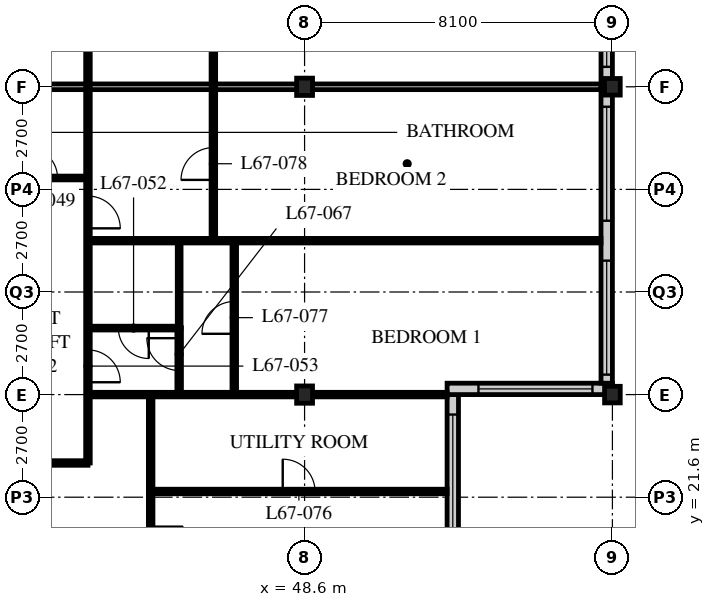
"""IFC4 building model, lengths in metres.
Left out: names, types, materials, properties, quantities, classifications, styles, units other than length and angle.
Written with IfcOpenShell. Run it as: python <this file> out.ifc"""

import sys

from ifc_helpers import new_model, si_unit, direction, frame, frame_2d, origin, origin_2d, place, context, subcontext, project, spatial, rectangle, i_section, extrude, element, fill, save


model = new_model("IFC4")
c1 = context("Model", 3, precision=1e-05, world=origin(), true_north=direction((0.0, 1.0)))
c2 = subcontext(c1, "Body", "Model", "MODEL_VIEW")
j1 = project(units=[si_unit("LENGTHUNIT", "METRE"), si_unit("PLANEANGLEUNIT", "RADIAN")], contexts=[c1])
p1 = place(None, origin())
s1 = spatial("IfcSite", under=j1, at=p1, CompositionType="ELEMENT")
p2 = place(p1, origin())
s2 = spatial("IfcBuilding", under=s1, at=p2, CompositionType="ELEMENT")
p3 = place(p2, frame((0.0, 0.0, 261.9)))
s3 = spatial("IfcBuildingStorey", under=s2, at=p3, CompositionType="ELEMENT", Elevation=261.9)
for number, where, z_axis, x_axis in (
    (1, (48.6, 24.3, 0.0), (0.0, 0.0, 1.0), (1.0, 0.0, 0.0)),
    (2, (48.6, 32.4, 0.0), (0.0, 0.0, 1.0), (1.0, 0.0, 0.0)),
):
    element("IfcColumn", number, at=place(p3, frame(where, z_axis=z_axis, x_axis=x_axis)), inside=s3, PredefinedType="COLUMN", context=c2, shape_type="SweptSolid", body=[
        extrude(i_section(OverallWidth=0.418, OverallDepth=0.456, WebThickness=0.042, FlangeThickness=0.067, FilletRadius=0.015, at=origin_2d()), origin(), (0.0, 0.0, 1.0), 3.9),
    ])
for number, where, z_axis, x_axis in (
    (3, (56.7, 24.3, 0.0), (0.0, 0.0, 1.0), (1.0, 0.0, 0.0)),
    (4, (56.7, 32.4, 0.0), (0.0, 0.0, 1.0), (1.0, 0.0, 0.0)),
):
    element("IfcColumn", number, at=place(p3, frame(where, z_axis=z_axis, x_axis=x_axis)), inside=s3, PredefinedType="COLUMN", context=c2, shape_type="SweptSolid", body=[
        extrude(i_section(OverallWidth=0.412, OverallDepth=0.437, WebThickness=0.036, FlangeThickness=0.058, FilletRadius=0.015, at=origin_2d()), origin(), (0.0, 0.0, 1.0), 3.9),
    ])
p4 = place(p3, frame((52.5, 20.55, 0.0), z_axis=(0.0, 0.0, 1.0), x_axis=(0.0, 1.0, 0.0)))
e5 = element("IfcWall", 5, at=p4, inside=s3, PredefinedType="SOLIDWALL", context=c2, shape_type="SweptSolid", body=[
    extrude(rectangle(XDim=3.75, YDim=0.3, at=frame_2d((1.875, 0.0))), origin(), (0.0, 0.0, 1.0), 3.69),
])
p5 = place(p4, frame((0.225, 0.0, 0.6)))
e6 = element("IfcOpeningElement", 6, at=p5, cuts=e5, PredefinedType="OPENING", context=c2, shape_type="SweptSolid", body=[
    extrude(rectangle(XDim=3.0, YDim=2.3, at=frame_2d((1.5, 1.15))), frame((0.0, 0.16, 0.0), z_axis=(0.0, -1.0, 0.0), x_axis=(1.0, 0.0, 0.0)), (0.0, 0.0, 1.0), 0.32),
])
p6 = place(p3, frame((52.35, 24.45, 0.0), z_axis=(0.0, 0.0, 1.0), x_axis=(1.0, 0.0, 0.0)))
e7 = element("IfcWall", 7, at=p6, inside=s3, PredefinedType="SOLIDWALL", context=c2, shape_type="SweptSolid", body=[
    extrude(rectangle(XDim=4.35, YDim=0.3, at=frame_2d((2.175, 0.0))), origin(), (0.0, 0.0, 1.0), 3.69),
])
p7 = place(p6, frame((0.825, 0.0, 0.6)))
e8 = element("IfcOpeningElement", 8, at=p7, cuts=e7, PredefinedType="OPENING", context=c2, shape_type="SweptSolid", body=[
    extrude(rectangle(XDim=3.0, YDim=2.3, at=frame_2d((1.5, 1.15))), frame((0.0, 0.16, 0.0), z_axis=(0.0, -1.0, 0.0), x_axis=(1.0, 0.0, 0.0)), (0.0, 0.0, 1.0), 0.32),
])
p8 = place(p3, frame((56.55, 24.6, 0.0), z_axis=(0.0, 0.0, 1.0), x_axis=(0.0, 1.0, 0.0)))
e9 = element("IfcWall", 9, at=p8, inside=s3, PredefinedType="SOLIDWALL", context=c2, shape_type="SweptSolid", body=[
    extrude(rectangle(XDim=32.1, YDim=0.3, at=frame_2d((16.05, 0.0))), origin(), (0.0, 0.0, 1.0), 3.69),
])
p9 = place(p8, frame((0.225, 0.0, 0.6)))
e10 = element("IfcOpeningElement", 10, at=p9, cuts=e9, PredefinedType="OPENING", context=c2, shape_type="SweptSolid", body=[
    extrude(rectangle(XDim=3.0, YDim=2.4, at=frame_2d((1.5, 1.2))), frame((0.0, 0.16, 0.0), z_axis=(0.0, -1.0, 0.0), x_axis=(1.0, 0.0, 0.0)), (0.0, 0.0, 1.0), 0.32),
])
p10 = place(p8, frame((4.275, 0.0, 0.6)))
e11 = element("IfcOpeningElement", 11, at=p10, cuts=e9, PredefinedType="OPENING", context=c2, shape_type="SweptSolid", body=[
    extrude(rectangle(XDim=3.0, YDim=2.4, at=frame_2d((1.5, 1.2))), frame((0.0, 0.16, 0.0), z_axis=(0.0, -1.0, 0.0), x_axis=(1.0, 0.0, 0.0)), (0.0, 0.0, 1.0), 0.32),
])
p11 = place(p8, frame((8.325, 0.0, 0.6)))
e12 = element("IfcOpeningElement", 12, at=p11, cuts=e9, PredefinedType="OPENING", context=c2, shape_type="SweptSolid", body=[
    extrude(rectangle(XDim=3.0, YDim=2.4, at=frame_2d((1.5, 1.2))), frame((0.0, 0.16, 0.0), z_axis=(0.0, -1.0, 0.0), x_axis=(1.0, 0.0, 0.0)), (0.0, 0.0, 1.0), 0.32),
])
p12 = place(p8, frame((12.375, 0.0, 0.6)))
e13 = element("IfcOpeningElement", 13, at=p12, cuts=e9, PredefinedType="OPENING", context=c2, shape_type="SweptSolid", body=[
    extrude(rectangle(XDim=3.0, YDim=2.4, at=frame_2d((1.5, 1.2))), frame((0.0, 0.16, 0.0), z_axis=(0.0, -1.0, 0.0), x_axis=(1.0, 0.0, 0.0)), (0.0, 0.0, 1.0), 0.32),
])
p13 = place(p8, frame((16.425, 0.0, 0.6)))
e14 = element("IfcOpeningElement", 14, at=p13, cuts=e9, PredefinedType="OPENING", context=c2, shape_type="SweptSolid", body=[
    extrude(rectangle(XDim=3.0, YDim=2.4, at=frame_2d((1.5, 1.2))), frame((0.0, 0.16, 0.0), z_axis=(0.0, -1.0, 0.0), x_axis=(1.0, 0.0, 0.0)), (0.0, 0.0, 1.0), 0.32),
])
p14 = place(p8, frame((20.475, 0.0, 0.6)))
e15 = element("IfcOpeningElement", 15, at=p14, cuts=e9, PredefinedType="OPENING", context=c2, shape_type="SweptSolid", body=[
    extrude(rectangle(XDim=3.0, YDim=2.4, at=frame_2d((1.5, 1.2))), frame((0.0, 0.16, 0.0), z_axis=(0.0, -1.0, 0.0), x_axis=(1.0, 0.0, 0.0)), (0.0, 0.0, 1.0), 0.32),
])
p15 = place(p8, frame((24.525, 0.0, 0.6)))
e16 = element("IfcOpeningElement", 16, at=p15, cuts=e9, PredefinedType="OPENING", context=c2, shape_type="SweptSolid", body=[
    extrude(rectangle(XDim=3.0, YDim=2.4, at=frame_2d((1.5, 1.2))), frame((0.0, 0.16, 0.0), z_axis=(0.0, -1.0, 0.0), x_axis=(1.0, 0.0, 0.0)), (0.0, 0.0, 1.0), 0.32),
])
p16 = place(p8, frame((28.575, 0.0, 0.6)))
e17 = element("IfcOpeningElement", 17, at=p16, cuts=e9, PredefinedType="OPENING", context=c2, shape_type="SweptSolid", body=[
    extrude(rectangle(XDim=3.0, YDim=2.4, at=frame_2d((1.5, 1.2))), frame((0.0, 0.16, 0.0), z_axis=(0.0, -1.0, 0.0), x_axis=(1.0, 0.0, 0.0)), (0.0, 0.0, 1.0), 0.32),
])
p17 = place(p3, frame((40.5, 30.0, 0.0), z_axis=(0.0, 0.0, 1.0), x_axis=(1.0, 0.0, 0.0)))
e18 = element("IfcWall", 18, at=p17, inside=s3, PredefinedType="PARTITIONING", context=c2, shape_type="SweptSolid", body=[
    extrude(rectangle(XDim=2.4, YDim=0.1, at=frame_2d((1.2, 0.0))), origin(), (0.0, 0.0, 1.0), 3.69),
])
p18 = place(p17, frame((0.8, 0.0, 0.0)))
e19 = element("IfcOpeningElement", 19, at=p18, cuts=e18, PredefinedType="OPENING", context=c2, shape_type="SweptSolid", body=[
    extrude(rectangle(XDim=0.8, YDim=2.1, at=frame_2d((0.4, 1.05))), frame((0.0, 0.06, 0.0), z_axis=(0.0, -1.0, 0.0), x_axis=(1.0, 0.0, 0.0)), (0.0, 0.0, 1.0), 0.12),
])
p19 = place(p3, frame((42.9, 22.5, 0.0), z_axis=(0.0, 0.0, 1.0), x_axis=(0.0, 1.0, 0.0)))
e20 = element("IfcWall", 20, at=p19, inside=s3, PredefinedType="PARTITIONING", context=c2, shape_type="SweptSolid", body=[
    extrude(rectangle(XDim=9.9, YDim=0.12, at=frame_2d((4.95, 0.0))), origin(), (0.0, 0.0, 1.0), 3.69),
])
p20 = place(p19, frame((2.125, 0.0, 0.0)))
e21 = element("IfcOpeningElement", 21, at=p20, cuts=e20, PredefinedType="OPENING", context=c2, shape_type="SweptSolid", body=[
    extrude(rectangle(XDim=0.85, YDim=2.1, at=frame_2d((0.425, 1.05))), frame((0.0, 0.07, 0.0), z_axis=(0.0, -1.0, 0.0), x_axis=(1.0, 0.0, 0.0)), (0.0, 0.0, 1.0), 0.14),
])
p21 = place(p19, frame((6.175, 0.0, 0.0)))
e22 = element("IfcOpeningElement", 22, at=p21, cuts=e20, PredefinedType="OPENING", context=c2, shape_type="SweptSolid", body=[
    extrude(rectangle(XDim=0.85, YDim=2.1, at=frame_2d((0.425, 1.05))), frame((0.0, 0.07, 0.0), z_axis=(0.0, -1.0, 0.0), x_axis=(1.0, 0.0, 0.0)), (0.0, 0.0, 1.0), 0.14),
])
p22 = place(p3, frame((36.45, 22.5, 0.0), z_axis=(0.0, 0.0, 1.0), x_axis=(1.0, 0.0, 0.0)))
e23 = element("IfcWall", 23, at=p22, inside=s3, PredefinedType="PARTITIONING", context=c2, shape_type="SweptSolid", body=[
    extrude(rectangle(XDim=6.45, YDim=0.12, at=frame_2d((3.225, 0.0))), origin(), (0.0, 0.0, 1.0), 3.69),
])
p23 = place(p22, frame((2.8, 0.0, 0.0)))
e24 = element("IfcOpeningElement", 24, at=p23, cuts=e23, PredefinedType="OPENING", context=c2, shape_type="SweptSolid", body=[
    extrude(rectangle(XDim=0.85, YDim=2.1, at=frame_2d((0.425, 1.05))), frame((0.0, 0.07, 0.0), z_axis=(0.0, -1.0, 0.0), x_axis=(1.0, 0.0, 0.0)), (0.0, 0.0, 1.0), 0.14),
])
p24 = place(p3, frame((42.9, 24.3, 0.0), z_axis=(0.0, 0.0, 1.0), x_axis=(1.0, 0.0, 0.0)))
e25 = element("IfcWall", 25, at=p24, inside=s3, PredefinedType="PARTITIONING", context=c2, shape_type="SweptSolid", body=[
    extrude(rectangle(XDim=9.45, YDim=0.12, at=frame_2d((4.725, 0.0))), origin(), (0.0, 0.0, 1.0), 3.078),
])
p25 = place(p3, frame((40.5, 32.4, 0.0), z_axis=(0.0, 0.0, 1.0), x_axis=(1.0, 0.0, 0.0)))
e26 = element("IfcWall", 26, at=p25, inside=s3, PredefinedType="PARTITIONING", context=c2, shape_type="SweptSolid", body=[
    extrude(rectangle(XDim=15.9, YDim=0.15, at=frame_2d((7.95, 0.0))), origin(), (0.0, 0.0, 1.0), 3.078),
])
p26 = place(p3, frame((44.55, 16.5, 0.0), z_axis=(0.0, 0.0, 1.0), x_axis=(0.0, 1.0, 0.0)))
e27 = element("IfcWall", 27, at=p26, inside=s3, PredefinedType="PARTITIONING", context=c2, shape_type="SweptSolid", body=[
    extrude(rectangle(XDim=7.8, YDim=0.12, at=frame_2d((3.9, 0.0))), origin(), (0.0, 0.0, 1.0), 3.69),
])
p27 = place(p26, frame((3.475, 0.0, 0.0)))
e28 = element("IfcOpeningElement", 28, at=p27, cuts=e27, PredefinedType="OPENING", context=c2, shape_type="SweptSolid", body=[
    extrude(rectangle(XDim=0.85, YDim=2.1, at=frame_2d((0.425, 1.05))), frame((0.0, 0.07, 0.0), z_axis=(0.0, -1.0, 0.0), x_axis=(1.0, 0.0, 0.0)), (0.0, 0.0, 1.0), 0.14),
])
p28 = place(p3, frame((42.9, 26.05, 0.0), z_axis=(0.0, 0.0, 1.0), x_axis=(1.0, 0.0, 0.0)))
e29 = element("IfcWall", 29, at=p28, inside=s3, PredefinedType="PARTITIONING", context=c2, shape_type="SweptSolid", body=[
    extrude(rectangle(XDim=2.4, YDim=0.1, at=frame_2d((1.2, 0.0))), origin(), (0.0, 0.0, 1.0), 3.69),
])
p29 = place(p28, frame((0.8, 0.0, 0.0)))
e30 = element("IfcOpeningElement", 30, at=p29, cuts=e29, PredefinedType="OPENING", context=c2, shape_type="SweptSolid", body=[
    extrude(rectangle(XDim=0.8, YDim=2.1, at=frame_2d((0.4, 1.05))), frame((0.0, 0.06, 0.0), z_axis=(0.0, -1.0, 0.0), x_axis=(1.0, 0.0, 0.0)), (0.0, 0.0, 1.0), 0.12),
])
p30 = place(p3, frame((45.3, 26.05, 0.0), z_axis=(0.0, 0.0, 1.0), x_axis=(0.0, 1.0, 0.0)))
e31 = element("IfcWall", 31, at=p30, inside=s3, PredefinedType="PARTITIONING", context=c2, shape_type="SweptSolid", body=[
    extrude(rectangle(XDim=2.3, YDim=0.1, at=frame_2d((1.15, 0.0))), origin(), (0.0, 0.0, 1.0), 3.69),
])
p31 = place(p3, frame((42.9, 28.35, 0.0), z_axis=(0.0, 0.0, 1.0), x_axis=(1.0, 0.0, 0.0)))
e32 = element("IfcWall", 32, at=p31, inside=s3, PredefinedType="PARTITIONING", context=c2, shape_type="SweptSolid", body=[
    extrude(rectangle(XDim=13.5, YDim=0.12, at=frame_2d((6.75, 0.0))), origin(), (0.0, 0.0, 1.0), 3.69),
])
p32 = place(p3, frame((42.9, 48.6, 0.0), z_axis=(0.0, 0.0, 1.0), x_axis=(0.0, -1.0, 0.0)))
e33 = element("IfcWall", 33, at=p32, inside=s3, PredefinedType="PARTITIONING", context=c2, shape_type="SweptSolid", body=[
    extrude(rectangle(XDim=16.2, YDim=0.12, at=frame_2d((8.1, 0.0))), origin(), (0.0, 0.0, 1.0), 3.69),
])
p33 = place(p32, frame((2.125, 0.0, 0.0)))
e34 = element("IfcOpeningElement", 34, at=p33, cuts=e33, PredefinedType="OPENING", context=c2, shape_type="SweptSolid", body=[
    extrude(rectangle(XDim=0.85, YDim=2.1, at=frame_2d((0.425, 1.05))), frame((0.0, 0.07, 0.0), z_axis=(0.0, -1.0, 0.0), x_axis=(1.0, 0.0, 0.0)), (0.0, 0.0, 1.0), 0.14),
])
p34 = place(p32, frame((8.425, 0.0, 0.0)))
e35 = element("IfcOpeningElement", 35, at=p34, cuts=e33, PredefinedType="OPENING", context=c2, shape_type="SweptSolid", body=[
    extrude(rectangle(XDim=0.85, YDim=2.1, at=frame_2d((0.425, 1.05))), frame((0.0, 0.07, 0.0), z_axis=(0.0, -1.0, 0.0), x_axis=(1.0, 0.0, 0.0)), (0.0, 0.0, 1.0), 0.14),
])
p35 = place(p32, frame((12.475, 0.0, 0.0)))
e36 = element("IfcOpeningElement", 36, at=p35, cuts=e33, PredefinedType="OPENING", context=c2, shape_type="SweptSolid", body=[
    extrude(rectangle(XDim=0.85, YDim=2.1, at=frame_2d((0.425, 1.05))), frame((0.0, 0.07, 0.0), z_axis=(0.0, -1.0, 0.0), x_axis=(1.0, 0.0, 0.0)), (0.0, 0.0, 1.0), 0.14),
])
p36 = place(p3, frame((45.3, 24.3, 0.0), z_axis=(0.0, 0.0, 1.0), x_axis=(0.0, 1.0, 0.0)))
e37 = element("IfcWall", 37, at=p36, inside=s3, PredefinedType="PARTITIONING", context=c2, shape_type="SweptSolid", body=[
    extrude(rectangle(XDim=1.76, YDim=0.12, at=frame_2d((0.88, 0.0))), origin(), (0.0, 0.0, 1.0), 3.69),
])
p37 = place(p36, frame((0.635, 0.0, 0.0)))
e38 = element("IfcOpeningElement", 38, at=p37, cuts=e37, PredefinedType="OPENING", context=c2, shape_type="SweptSolid", body=[
    extrude(rectangle(XDim=0.85, YDim=2.1, at=frame_2d((0.425, 1.05))), frame((0.0, 0.07, 0.0), z_axis=(0.0, -1.0, 0.0), x_axis=(1.0, 0.0, 0.0)), (0.0, 0.0, 1.0), 0.14),
])
p38 = place(p3, frame((44.55, 21.75, 0.0), z_axis=(0.0, 0.0, 1.0), x_axis=(1.0, 0.0, 0.0)))
e39 = element("IfcWall", 39, at=p38, inside=s3, PredefinedType="PARTITIONING", context=c2, shape_type="SweptSolid", body=[
    extrude(rectangle(XDim=7.8, YDim=0.12, at=frame_2d((3.9, 0.0))), origin(), (0.0, 0.0, 1.0), 3.69),
])
p39 = place(p38, frame((3.475, 0.0, 0.0)))
e40 = element("IfcOpeningElement", 40, at=p39, cuts=e39, PredefinedType="OPENING", context=c2, shape_type="SweptSolid", body=[
    extrude(rectangle(XDim=0.85, YDim=2.1, at=frame_2d((0.425, 1.05))), frame((0.0, 0.07, 0.0), z_axis=(0.0, -1.0, 0.0), x_axis=(1.0, 0.0, 0.0)), (0.0, 0.0, 1.0), 0.14),
])
p40 = place(p3, frame((46.75, 24.3, 0.0), z_axis=(0.0, 0.0, 1.0), x_axis=(0.0, 1.0, 0.0)))
e41 = element("IfcWall", 41, at=p40, inside=s3, PredefinedType="PARTITIONING", context=c2, shape_type="SweptSolid", body=[
    extrude(rectangle(XDim=4.05, YDim=0.12, at=frame_2d((2.025, 0.0))), origin(), (0.0, 0.0, 1.0), 3.69),
])
p41 = place(p40, frame((1.6, 0.0, 0.0)))
e42 = element("IfcOpeningElement", 42, at=p41, cuts=e41, PredefinedType="OPENING", context=c2, shape_type="SweptSolid", body=[
    extrude(rectangle(XDim=0.85, YDim=2.1, at=frame_2d((0.425, 1.05))), frame((0.0, 0.07, 0.0), z_axis=(0.0, -1.0, 0.0), x_axis=(1.0, 0.0, 0.0)), (0.0, 0.0, 1.0), 0.14),
])
p42 = place(p3, frame((46.2, 28.35, 0.0), z_axis=(0.0, 0.0, 1.0), x_axis=(0.0, 1.0, 0.0)))
e43 = element("IfcWall", 43, at=p42, inside=s3, PredefinedType="PARTITIONING", context=c2, shape_type="SweptSolid", body=[
    extrude(rectangle(XDim=12.15, YDim=0.12, at=frame_2d((6.075, 0.0))), origin(), (0.0, 0.0, 1.0), 3.69),
])
p43 = place(p42, frame((1.6, 0.0, 0.0)))
e44 = element("IfcOpeningElement", 44, at=p43, cuts=e43, PredefinedType="OPENING", context=c2, shape_type="SweptSolid", body=[
    extrude(rectangle(XDim=0.85, YDim=2.1, at=frame_2d((0.425, 1.05))), frame((0.0, 0.07, 0.0), z_axis=(0.0, -1.0, 0.0), x_axis=(1.0, 0.0, 0.0)), (0.0, 0.0, 1.0), 0.14),
])
p44 = place(p42, frame((9.7, 0.0, 0.0)))
e45 = element("IfcOpeningElement", 45, at=p44, cuts=e43, PredefinedType="OPENING", context=c2, shape_type="SweptSolid", body=[
    extrude(rectangle(XDim=0.85, YDim=2.1, at=frame_2d((0.425, 1.05))), frame((0.0, 0.07, 0.0), z_axis=(0.0, -1.0, 0.0), x_axis=(1.0, 0.0, 0.0)), (0.0, 0.0, 1.0), 0.14),
])
p45 = place(p42, frame((5.65, 0.0, 0.0)))
e46 = element("IfcOpeningElement", 46, at=p45, cuts=e43, PredefinedType="OPENING", context=c2, shape_type="SweptSolid", body=[
    extrude(rectangle(XDim=0.85, YDim=2.1, at=frame_2d((0.425, 1.05))), frame((0.0, 0.07, 0.0), z_axis=(0.0, -1.0, 0.0), x_axis=(1.0, 0.0, 0.0)), (0.0, 0.0, 1.0), 0.14),
])
p46 = place(p5, origin())
e47 = element("IfcWindow", 47, at=p46, inside=s3, PartitioningType="SINGLE_PANEL", PredefinedType="WINDOW", context=c2, shape_type="SweptSolid", body=[
    extrude(rectangle(XDim=3.0, YDim=2.3, at=frame_2d((1.5, 1.15))), frame((0.0, 0.03, 0.0), z_axis=(0.0, -1.0, 0.0), x_axis=(1.0, 0.0, 0.0)), (0.0, 0.0, 1.0), 0.06),
])
fill(e6, e47)
p47 = place(p7, origin())
e48 = element("IfcWindow", 48, at=p47, inside=s3, PartitioningType="SINGLE_PANEL", PredefinedType="WINDOW", context=c2, shape_type="SweptSolid", body=[
    extrude(rectangle(XDim=3.0, YDim=2.3, at=frame_2d((1.5, 1.15))), frame((0.0, 0.03, 0.0), z_axis=(0.0, -1.0, 0.0), x_axis=(1.0, 0.0, 0.0)), (0.0, 0.0, 1.0), 0.06),
])
fill(e8, e48)
p48 = place(p9, origin())
e49 = element("IfcWindow", 49, at=p48, inside=s3, PartitioningType="SINGLE_PANEL", PredefinedType="WINDOW", context=c2, shape_type="SweptSolid", body=[
    extrude(rectangle(XDim=3.0, YDim=2.4, at=frame_2d((1.5, 1.2))), frame((0.0, 0.03, 0.0), z_axis=(0.0, -1.0, 0.0), x_axis=(1.0, 0.0, 0.0)), (0.0, 0.0, 1.0), 0.06),
])
fill(e10, e49)
p49 = place(p10, origin())
e50 = element("IfcWindow", 50, at=p49, inside=s3, PartitioningType="SINGLE_PANEL", PredefinedType="WINDOW", context=c2, shape_type="SweptSolid", body=[
    extrude(rectangle(XDim=3.0, YDim=2.4, at=frame_2d((1.5, 1.2))), frame((0.0, 0.03, 0.0), z_axis=(0.0, -1.0, 0.0), x_axis=(1.0, 0.0, 0.0)), (0.0, 0.0, 1.0), 0.06),
])
fill(e11, e50)
p50 = place(p11, origin())
e51 = element("IfcWindow", 51, at=p50, inside=s3, PartitioningType="SINGLE_PANEL", PredefinedType="WINDOW", context=c2, shape_type="SweptSolid", body=[
    extrude(rectangle(XDim=3.0, YDim=2.4, at=frame_2d((1.5, 1.2))), frame((0.0, 0.03, 0.0), z_axis=(0.0, -1.0, 0.0), x_axis=(1.0, 0.0, 0.0)), (0.0, 0.0, 1.0), 0.06),
])
fill(e12, e51)
p51 = place(p18, origin())
e52 = element("IfcDoor", 52, at=p51, inside=s3, OperationType="SINGLE_SWING_LEFT", PredefinedType="DOOR", context=c2, shape_type="SweptSolid", body=[
    extrude(rectangle(XDim=0.8, YDim=2.1, at=frame_2d((0.4, 1.05))), frame((0.0, 0.025, 0.0), z_axis=(0.0, -1.0, 0.0), x_axis=(1.0, 0.0, 0.0)), (0.0, 0.0, 1.0), 0.05),
])
fill(e19, e52)
p52 = place(p27, origin())
e53 = element("IfcDoor", 53, at=p52, inside=s3, OperationType="SINGLE_SWING_LEFT", PredefinedType="DOOR", context=c2, shape_type="SweptSolid", body=[
    extrude(rectangle(XDim=0.85, YDim=2.1, at=frame_2d((0.425, 1.05))), frame((0.0, 0.025, 0.0), z_axis=(0.0, -1.0, 0.0), x_axis=(1.0, 0.0, 0.0)), (0.0, 0.0, 1.0), 0.05),
])
fill(e28, e53)
p53 = place(p29, origin())
e54 = element("IfcDoor", 54, at=p53, inside=s3, OperationType="SINGLE_SWING_LEFT", PredefinedType="DOOR", context=c2, shape_type="SweptSolid", body=[
    extrude(rectangle(XDim=0.8, YDim=2.1, at=frame_2d((0.4, 1.05))), frame((0.0, 0.025, 0.0), z_axis=(0.0, -1.0, 0.0), x_axis=(1.0, 0.0, 0.0)), (0.0, 0.0, 1.0), 0.05),
])
fill(e30, e54)
p54 = place(p20, origin())
e55 = element("IfcDoor", 55, at=p54, inside=s3, OperationType="SINGLE_SWING_RIGHT", PredefinedType="DOOR", context=c2, shape_type="SweptSolid", body=[
    extrude(rectangle(XDim=0.85, YDim=2.1, at=frame_2d((0.425, 1.05))), frame((0.0, 0.025, 0.0), z_axis=(0.0, -1.0, 0.0), x_axis=(1.0, 0.0, 0.0)), (0.0, 0.0, 1.0), 0.05),
])
fill(e21, e55)
p55 = place(p21, origin())
e56 = element("IfcDoor", 56, at=p55, inside=s3, OperationType="SINGLE_SWING_RIGHT", PredefinedType="DOOR", context=c2, shape_type="SweptSolid", body=[
    extrude(rectangle(XDim=0.85, YDim=2.1, at=frame_2d((0.425, 1.05))), frame((0.0, 0.025, 0.0), z_axis=(0.0, -1.0, 0.0), x_axis=(1.0, 0.0, 0.0)), (0.0, 0.0, 1.0), 0.05),
])
fill(e22, e56)
p56 = place(p37, origin())
e57 = element("IfcDoor", 57, at=p56, inside=s3, OperationType="SINGLE_SWING_RIGHT", PredefinedType="DOOR", context=c2, shape_type="SweptSolid", body=[
    extrude(rectangle(XDim=0.85, YDim=2.1, at=frame_2d((0.425, 1.05))), frame((0.0, 0.025, 0.0), z_axis=(0.0, -1.0, 0.0), x_axis=(1.0, 0.0, 0.0)), (0.0, 0.0, 1.0), 0.05),
])
fill(e38, e57)
p57 = place(p39, origin())
e58 = element("IfcDoor", 58, at=p57, inside=s3, OperationType="SINGLE_SWING_LEFT", PredefinedType="DOOR", context=c2, shape_type="SweptSolid", body=[
    extrude(rectangle(XDim=0.85, YDim=2.1, at=frame_2d((0.425, 1.05))), frame((0.0, 0.025, 0.0), z_axis=(0.0, -1.0, 0.0), x_axis=(1.0, 0.0, 0.0)), (0.0, 0.0, 1.0), 0.05),
])
fill(e40, e58)
p58 = place(p41, origin())
e59 = element("IfcDoor", 59, at=p58, inside=s3, OperationType="SINGLE_SWING_LEFT", PredefinedType="DOOR", context=c2, shape_type="SweptSolid", body=[
    extrude(rectangle(XDim=0.85, YDim=2.1, at=frame_2d((0.425, 1.05))), frame((0.0, 0.025, 0.0), z_axis=(0.0, -1.0, 0.0), x_axis=(1.0, 0.0, 0.0)), (0.0, 0.0, 1.0), 0.05),
])
fill(e42, e59)
p59 = place(p43, origin())
e60 = element("IfcDoor", 60, at=p59, inside=s3, OperationType="SINGLE_SWING_LEFT", PredefinedType="DOOR", context=c2, shape_type="SweptSolid", body=[
    extrude(rectangle(XDim=0.85, YDim=2.1, at=frame_2d((0.425, 1.05))), frame((0.0, 0.025, 0.0), z_axis=(0.0, -1.0, 0.0), x_axis=(1.0, 0.0, 0.0)), (0.0, 0.0, 1.0), 0.05),
])
fill(e44, e60)
save(model, sys.argv[1])
